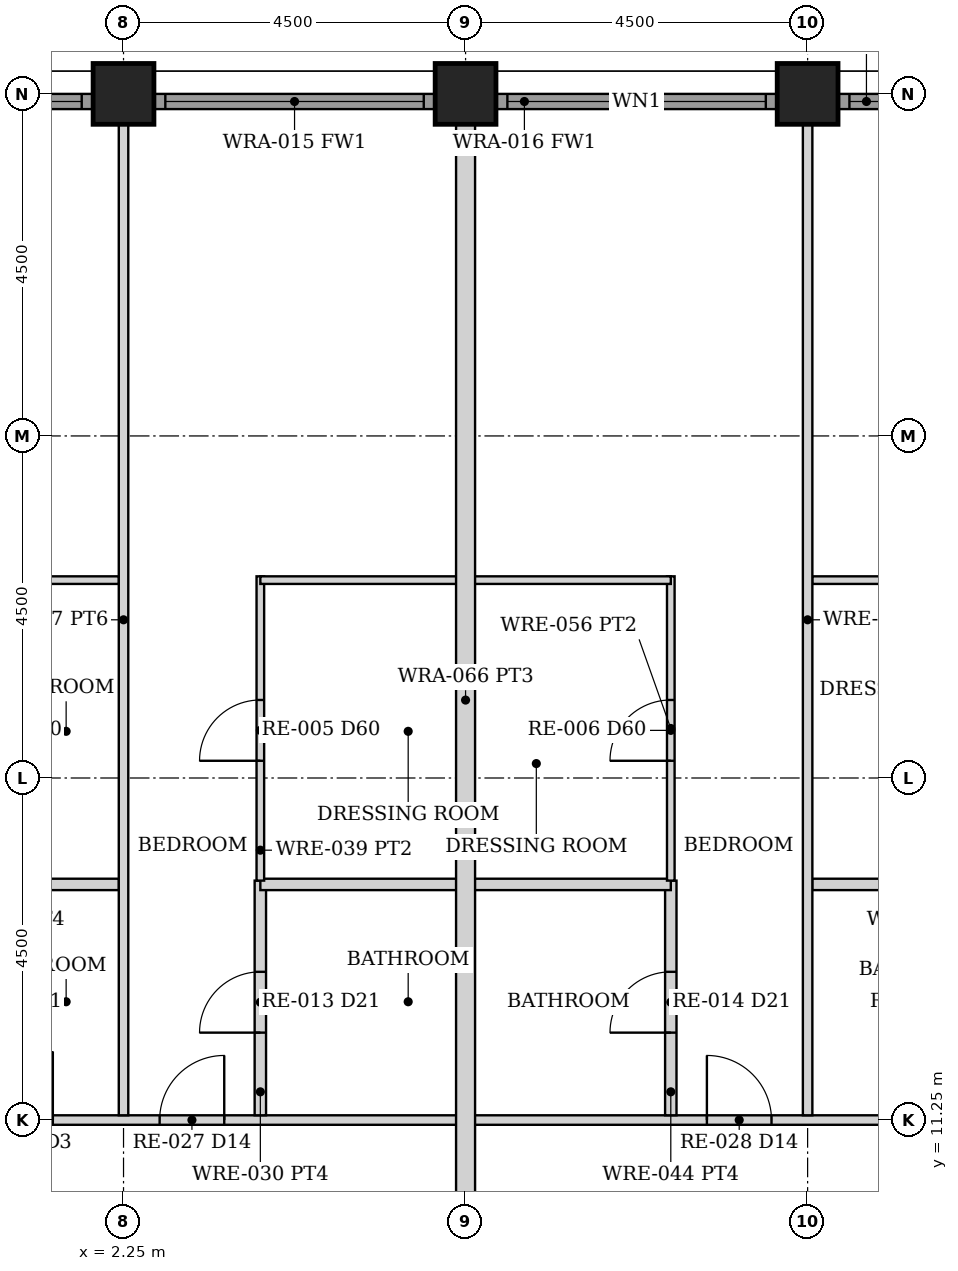
"""IFC4 building model, lengths in metres.
Left out: names, types, materials, properties, quantities, classifications, styles, units other than length and angle.
Written with IfcOpenShell. Run it as: python <this file> out.ifc"""

import sys

from ifc_helpers import new_model, si_unit, direction, frame, frame_2d, origin, origin_2d, place, context, subcontext, project, spatial, rectangle, hollow_rectangle, extrude, element, fill, save


model = new_model("IFC4")
c1 = context("Model", 3, precision=1e-05, world=origin(), true_north=direction((0.0, 1.0)))
c2 = subcontext(c1, "Body", "Model", "MODEL_VIEW")
j1 = project(units=[si_unit("LENGTHUNIT", "METRE"), si_unit("PLANEANGLEUNIT", "RADIAN")], contexts=[c1])
p1 = place(None, origin())
s1 = spatial("IfcSite", under=j1, at=p1, CompositionType="ELEMENT")
p2 = place(p1, origin())
s2 = spatial("IfcBuilding", under=s1, at=p2, CompositionType="ELEMENT")
p3 = place(p2, frame((0.0, 0.0, 68.5)))
s3 = spatial("IfcBuildingStorey", under=s2, at=p3, CompositionType="ELEMENT", Elevation=68.5)
for number, where, z_axis, x_axis in (
    (1, (2.25, 24.75, 0.0), (0.0, 0.0, 1.0), (0.0, 1.0, 0.0)),
    (2, (6.75, 24.75, 0.0), (0.0, 0.0, 1.0), (0.0, 1.0, 0.0)),
    (3, (11.25, 24.75, 0.0), (0.0, 0.0, 1.0), (0.0, 1.0, 0.0)),
):
    element("IfcColumn", number, at=place(p3, frame(where, z_axis=z_axis, x_axis=x_axis)), inside=s3, PredefinedType="COLUMN", context=c2, shape_type="SweptSolid", body=[
        extrude(hollow_rectangle(XDim=0.8, YDim=0.8, WallThickness=0.06, at=origin_2d()), origin(), (0.0, 0.0, 1.0), 3.5),
    ])
p4 = place(p3, frame((-1.845, 24.65, 0.0), z_axis=(0.0, 0.0, 1.0), x_axis=(1.0, 0.0, 0.0)))
e4 = element("IfcWall", 4, at=p4, inside=s3, PredefinedType="SOLIDWALL", context=c2, shape_type="SweptSolid", body=[
    extrude(rectangle(XDim=3.69, YDim=0.2, at=frame_2d((1.845, 0.0))), origin(), (0.0, 0.0, 1.0), 2.379),
])
p5 = place(p4, frame((0.145, 0.0, 0.3)))
e5 = element("IfcOpeningElement", 5, at=p5, cuts=e4, PredefinedType="OPENING", context=c2, shape_type="SweptSolid", body=[
    extrude(rectangle(XDim=3.4, YDim=1.929, at=frame_2d((1.7, 0.964))), frame((0.0, 0.11, 0.0), z_axis=(0.0, -1.0, 0.0), x_axis=(1.0, 0.0, 0.0)), (0.0, 0.0, 1.0), 0.22),
])
p6 = place(p3, frame((2.655, 24.65, 0.0), z_axis=(0.0, 0.0, 1.0), x_axis=(1.0, 0.0, 0.0)))
e6 = element("IfcWall", 6, at=p6, inside=s3, PredefinedType="SOLIDWALL", context=c2, shape_type="SweptSolid", body=[
    extrude(rectangle(XDim=3.69, YDim=0.2, at=frame_2d((1.845, 0.0))), origin(), (0.0, 0.0, 1.0), 2.379),
])
p7 = place(p6, frame((0.145, 0.0, 0.3)))
e7 = element("IfcOpeningElement", 7, at=p7, cuts=e6, PredefinedType="OPENING", context=c2, shape_type="SweptSolid", body=[
    extrude(rectangle(XDim=3.4, YDim=1.929, at=frame_2d((1.7, 0.964))), frame((0.0, 0.11, 0.0), z_axis=(0.0, -1.0, 0.0), x_axis=(1.0, 0.0, 0.0)), (0.0, 0.0, 1.0), 0.22),
])
p8 = place(p3, frame((7.155, 24.65, 0.0), z_axis=(0.0, 0.0, 1.0), x_axis=(1.0, 0.0, 0.0)))
e8 = element("IfcWall", 8, at=p8, inside=s3, PredefinedType="SOLIDWALL", context=c2, shape_type="SweptSolid", body=[
    extrude(rectangle(XDim=3.69, YDim=0.2, at=frame_2d((1.845, 0.0))), origin(), (0.0, 0.0, 1.0), 2.379),
])
p9 = place(p8, frame((0.145, 0.0, 0.3)))
e9 = element("IfcOpeningElement", 9, at=p9, cuts=e8, PredefinedType="OPENING", context=c2, shape_type="SweptSolid", body=[
    extrude(rectangle(XDim=3.4, YDim=1.929, at=frame_2d((1.7, 0.964))), frame((0.0, 0.11, 0.0), z_axis=(0.0, -1.0, 0.0), x_axis=(1.0, 0.0, 0.0)), (0.0, 0.0, 1.0), 0.22),
])
p10 = place(p3, frame((11.655, 24.65, 0.0), z_axis=(0.0, 0.0, 1.0), x_axis=(1.0, 0.0, 0.0)))
e10 = element("IfcWall", 10, at=p10, inside=s3, PredefinedType="SOLIDWALL", context=c2, shape_type="SweptSolid", body=[
    extrude(rectangle(XDim=3.69, YDim=0.2, at=frame_2d((1.845, 0.0))), origin(), (0.0, 0.0, 1.0), 2.379),
])
p11 = place(p10, frame((0.145, 0.0, 0.3)))
e11 = element("IfcOpeningElement", 11, at=p11, cuts=e10, PredefinedType="OPENING", context=c2, shape_type="SweptSolid", body=[
    extrude(rectangle(XDim=3.4, YDim=1.929, at=frame_2d((1.7, 0.964))), frame((0.0, 0.11, 0.0), z_axis=(0.0, -1.0, 0.0), x_axis=(1.0, 0.0, 0.0)), (0.0, 0.0, 1.0), 0.22),
])
p12 = place(p3, frame((-6.65, 11.25, 0.0), z_axis=(0.0, 0.0, 1.0), x_axis=(1.0, 0.0, 0.0)))
e12 = element("IfcWall", 12, at=p12, inside=s3, PredefinedType="PARTITIONING", context=c2, shape_type="SweptSolid", body=[
    extrude(rectangle(XDim=13.3, YDim=0.125, at=frame_2d((6.65, 0.0))), origin(), (0.0, 0.0, 1.0), 2.373),
])
p13 = place(p12, frame((0.7, 0.0, 0.0)))
e13 = element("IfcOpeningElement", 13, at=p13, cuts=e12, PredefinedType="OPENING", context=c2, shape_type="SweptSolid", body=[
    extrude(rectangle(XDim=0.9, YDim=2.1, at=frame_2d((0.45, 1.05))), frame((0.0, 0.073, 0.0), z_axis=(0.0, -1.0, 0.0), x_axis=(1.0, 0.0, 0.0)), (0.0, 0.0, 1.0), 0.145),
])
p14 = place(p12, frame((2.7, 0.0, 0.0)))
e14 = element("IfcOpeningElement", 14, at=p14, cuts=e12, PredefinedType="OPENING", context=c2, shape_type="SweptSolid", body=[
    extrude(rectangle(XDim=1.4, YDim=2.1, at=frame_2d((0.7, 1.05))), frame((0.0, 0.073, 0.0), z_axis=(0.0, -1.0, 0.0), x_axis=(1.0, 0.0, 0.0)), (0.0, 0.0, 1.0), 0.145),
])
p15 = place(p12, frame((4.875, 0.0, 0.0)))
e15 = element("IfcOpeningElement", 15, at=p15, cuts=e12, PredefinedType="OPENING", context=c2, shape_type="SweptSolid", body=[
    extrude(rectangle(XDim=0.85, YDim=2.1, at=frame_2d((0.425, 1.05))), frame((0.0, 0.073, 0.0), z_axis=(0.0, -1.0, 0.0), x_axis=(1.0, 0.0, 0.0)), (0.0, 0.0, 1.0), 0.145),
])
p16 = place(p12, frame((7.07, 0.0, 0.0)))
e16 = element("IfcOpeningElement", 16, at=p16, cuts=e12, PredefinedType="OPENING", context=c2, shape_type="SweptSolid", body=[
    extrude(rectangle(XDim=0.9, YDim=2.1, at=frame_2d((0.45, 1.05))), frame((0.0, 0.073, 0.0), z_axis=(0.0, -1.0, 0.0), x_axis=(1.0, 0.0, 0.0)), (0.0, 0.0, 1.0), 0.145),
])
p17 = place(p12, frame((9.375, 0.0, 0.0)))
e17 = element("IfcOpeningElement", 17, at=p17, cuts=e12, PredefinedType="OPENING", context=c2, shape_type="SweptSolid", body=[
    extrude(rectangle(XDim=0.85, YDim=2.1, at=frame_2d((0.425, 1.05))), frame((0.0, 0.073, 0.0), z_axis=(0.0, -1.0, 0.0), x_axis=(1.0, 0.0, 0.0)), (0.0, 0.0, 1.0), 0.145),
])
p18 = place(p3, frame((-0.45, 14.35, 0.0), z_axis=(0.0, 0.0, 1.0), x_axis=(1.0, 0.0, 0.0)))
e18 = element("IfcWall", 18, at=p18, inside=s3, PredefinedType="PARTITIONING", context=c2, shape_type="SweptSolid", body=[
    extrude(rectangle(XDim=2.64, YDim=0.15, at=frame_2d((1.32, 0.0))), origin(), (0.0, 0.0, 1.0), 2.373),
])
p19 = place(p3, frame((-0.45, 18.353, 0.0), z_axis=(0.0, 0.0, 1.0), x_axis=(1.0, 0.0, 0.0)))
e19 = element("IfcWall", 19, at=p19, inside=s3, PredefinedType="PARTITIONING", context=c2, shape_type="SweptSolid", body=[
    extrude(rectangle(XDim=2.64, YDim=0.1, at=frame_2d((1.32, 0.0))), origin(), (0.0, 0.0, 1.0), 2.373),
])
p20 = place(p3, frame((2.25, 11.312, 0.0), z_axis=(0.0, 0.0, 1.0), x_axis=(0.0, 1.0, 0.0)))
e20 = element("IfcWall", 20, at=p20, inside=s3, PredefinedType="PARTITIONING", context=c2, shape_type="SweptSolid", body=[
    extrude(rectangle(XDim=13.038, YDim=0.125, at=frame_2d((6.519, 0.0))), origin(), (0.0, 0.0, 1.0), 2.373),
])
p21 = place(p3, frame((4.05, 11.312, 0.0), z_axis=(0.0, 0.0, 1.0), x_axis=(0.0, 1.0, 0.0)))
e21 = element("IfcWall", 21, at=p21, inside=s3, PredefinedType="PARTITIONING", context=c2, shape_type="SweptSolid", body=[
    extrude(rectangle(XDim=3.087, YDim=0.15, at=frame_2d((1.544, 0.0))), origin(), (0.0, 0.0, 1.0), 2.373),
])
p22 = place(p21, frame((1.087, 0.0, 0.0)))
e22 = element("IfcOpeningElement", 22, at=p22, cuts=e21, PredefinedType="OPENING", context=c2, shape_type="SweptSolid", body=[
    extrude(rectangle(XDim=0.8, YDim=2.1, at=frame_2d((0.4, 1.05))), frame((0.0, 0.085, 0.0), z_axis=(0.0, -1.0, 0.0), x_axis=(1.0, 0.0, 0.0)), (0.0, 0.0, 1.0), 0.17),
])
p23 = place(p3, frame((4.05, 14.35, 0.0), z_axis=(0.0, 0.0, 1.0), x_axis=(1.0, 0.0, 0.0)))
e23 = element("IfcWall", 23, at=p23, inside=s3, PredefinedType="PARTITIONING", context=c2, shape_type="SweptSolid", body=[
    extrude(rectangle(XDim=2.64, YDim=0.15, at=frame_2d((1.32, 0.0))), origin(), (0.0, 0.0, 1.0), 2.373),
])
p24 = place(p3, frame((4.05, 14.4, 0.0), z_axis=(0.0, 0.0, 1.0), x_axis=(0.0, 1.0, 0.0)))
e24 = element("IfcWall", 24, at=p24, inside=s3, PredefinedType="PARTITIONING", context=c2, shape_type="SweptSolid", body=[
    extrude(rectangle(XDim=4.003, YDim=0.1, at=frame_2d((2.001, 0.0))), origin(), (0.0, 0.0, 1.0), 2.373),
])
p25 = place(p24, frame((1.576, 0.0, 0.0)))
e25 = element("IfcOpeningElement", 25, at=p25, cuts=e24, PredefinedType="OPENING", context=c2, shape_type="SweptSolid", body=[
    extrude(rectangle(XDim=0.8, YDim=2.1, at=frame_2d((0.4, 1.05))), frame((0.0, 0.06, 0.0), z_axis=(0.0, -1.0, 0.0), x_axis=(1.0, 0.0, 0.0)), (0.0, 0.0, 1.0), 0.12),
])
p26 = place(p3, frame((4.05, 18.353, 0.0), z_axis=(0.0, 0.0, 1.0), x_axis=(1.0, 0.0, 0.0)))
e26 = element("IfcWall", 26, at=p26, inside=s3, PredefinedType="PARTITIONING", context=c2, shape_type="SweptSolid", body=[
    extrude(rectangle(XDim=2.64, YDim=0.1, at=frame_2d((1.32, 0.0))), origin(), (0.0, 0.0, 1.0), 2.373),
])
p27 = place(p3, frame((6.85, 11.25, 0.0), z_axis=(0.0, 0.0, 1.0), x_axis=(1.0, 0.0, 0.0)))
e27 = element("IfcWall", 27, at=p27, inside=s3, PredefinedType="PARTITIONING", context=c2, shape_type="SweptSolid", body=[
    extrude(rectangle(XDim=17.5, YDim=0.125, at=frame_2d((8.75, 0.0))), origin(), (0.0, 0.0, 1.0), 2.373),
])
p28 = place(p27, frame((13.975, 0.0, 0.0)))
e28 = element("IfcOpeningElement", 28, at=p28, cuts=e27, PredefinedType="OPENING", context=c2, shape_type="SweptSolid", body=[
    extrude(rectangle(XDim=0.9, YDim=2.1, at=frame_2d((0.45, 1.05))), frame((0.0, 0.073, 0.0), z_axis=(0.0, -1.0, 0.0), x_axis=(1.0, 0.0, 0.0)), (0.0, 0.0, 1.0), 0.145),
])
p29 = place(p27, frame((15.75, 0.0, 0.0)))
e29 = element("IfcOpeningElement", 29, at=p29, cuts=e27, PredefinedType="OPENING", context=c2, shape_type="SweptSolid", body=[
    extrude(rectangle(XDim=1.4, YDim=2.1, at=frame_2d((0.7, 1.05))), frame((0.0, 0.073, 0.0), z_axis=(0.0, -1.0, 0.0), x_axis=(1.0, 0.0, 0.0)), (0.0, 0.0, 1.0), 0.145),
])
p30 = place(p27, frame((12.075, 0.0, 0.0)))
e30 = element("IfcOpeningElement", 30, at=p30, cuts=e27, PredefinedType="OPENING", context=c2, shape_type="SweptSolid", body=[
    extrude(rectangle(XDim=0.85, YDim=2.1, at=frame_2d((0.425, 1.05))), frame((0.0, 0.073, 0.0), z_axis=(0.0, -1.0, 0.0), x_axis=(1.0, 0.0, 0.0)), (0.0, 0.0, 1.0), 0.145),
])
p31 = place(p27, frame((9.83, 0.0, 0.0)))
e31 = element("IfcOpeningElement", 31, at=p31, cuts=e27, PredefinedType="OPENING", context=c2, shape_type="SweptSolid", body=[
    extrude(rectangle(XDim=0.9, YDim=2.1, at=frame_2d((0.45, 1.05))), frame((0.0, 0.073, 0.0), z_axis=(0.0, -1.0, 0.0), x_axis=(1.0, 0.0, 0.0)), (0.0, 0.0, 1.0), 0.145),
])
p32 = place(p27, frame((7.575, 0.0, 0.0)))
e32 = element("IfcOpeningElement", 32, at=p32, cuts=e27, PredefinedType="OPENING", context=c2, shape_type="SweptSolid", body=[
    extrude(rectangle(XDim=0.85, YDim=2.1, at=frame_2d((0.425, 1.05))), frame((0.0, 0.073, 0.0), z_axis=(0.0, -1.0, 0.0), x_axis=(1.0, 0.0, 0.0)), (0.0, 0.0, 1.0), 0.145),
])
p33 = place(p27, frame((3.075, 0.0, 0.0)))
e33 = element("IfcOpeningElement", 33, at=p33, cuts=e27, PredefinedType="OPENING", context=c2, shape_type="SweptSolid", body=[
    extrude(rectangle(XDim=0.85, YDim=2.1, at=frame_2d((0.425, 1.05))), frame((0.0, 0.073, 0.0), z_axis=(0.0, -1.0, 0.0), x_axis=(1.0, 0.0, 0.0)), (0.0, 0.0, 1.0), 0.145),
])
p34 = place(p3, frame((11.31, 14.35, 0.0), z_axis=(0.0, 0.0, 1.0), x_axis=(1.0, 0.0, 0.0)))
e34 = element("IfcWall", 34, at=p34, inside=s3, PredefinedType="PARTITIONING", context=c2, shape_type="SweptSolid", body=[
    extrude(rectangle(XDim=2.64, YDim=0.15, at=frame_2d((1.32, 0.0))), origin(), (0.0, 0.0, 1.0), 2.373),
])
p35 = place(p3, frame((11.31, 18.353, 0.0), z_axis=(0.0, 0.0, 1.0), x_axis=(1.0, 0.0, 0.0)))
e35 = element("IfcWall", 35, at=p35, inside=s3, PredefinedType="PARTITIONING", context=c2, shape_type="SweptSolid", body=[
    extrude(rectangle(XDim=2.64, YDim=0.1, at=frame_2d((1.32, 0.0))), origin(), (0.0, 0.0, 1.0), 2.373),
])
p36 = place(p3, frame((11.25, 11.312, 0.0), z_axis=(0.0, 0.0, 1.0), x_axis=(0.0, 1.0, 0.0)))
e36 = element("IfcWall", 36, at=p36, inside=s3, PredefinedType="PARTITIONING", context=c2, shape_type="SweptSolid", body=[
    extrude(rectangle(XDim=13.038, YDim=0.125, at=frame_2d((6.519, 0.0))), origin(), (0.0, 0.0, 1.0), 2.373),
])
p37 = place(p3, frame((9.45, 11.312, 0.0), z_axis=(0.0, 0.0, 1.0), x_axis=(0.0, 1.0, 0.0)))
e37 = element("IfcWall", 37, at=p37, inside=s3, PredefinedType="PARTITIONING", context=c2, shape_type="SweptSolid", body=[
    extrude(rectangle(XDim=3.087, YDim=0.15, at=frame_2d((1.544, 0.0))), origin(), (0.0, 0.0, 1.0), 2.373),
])
p38 = place(p37, frame((1.087, 0.0, 0.0)))
e38 = element("IfcOpeningElement", 38, at=p38, cuts=e37, PredefinedType="OPENING", context=c2, shape_type="SweptSolid", body=[
    extrude(rectangle(XDim=0.8, YDim=2.1, at=frame_2d((0.4, 1.05))), frame((0.0, 0.085, 0.0), z_axis=(0.0, -1.0, 0.0), x_axis=(1.0, 0.0, 0.0)), (0.0, 0.0, 1.0), 0.17),
])
p39 = place(p3, frame((6.81, 14.35, 0.0), z_axis=(0.0, 0.0, 1.0), x_axis=(1.0, 0.0, 0.0)))
e39 = element("IfcWall", 39, at=p39, inside=s3, PredefinedType="PARTITIONING", context=c2, shape_type="SweptSolid", body=[
    extrude(rectangle(XDim=2.64, YDim=0.15, at=frame_2d((1.32, 0.0))), origin(), (0.0, 0.0, 1.0), 2.373),
])
p40 = place(p3, frame((9.45, 14.4, 0.0), z_axis=(0.0, 0.0, 1.0), x_axis=(0.0, 1.0, 0.0)))
e40 = element("IfcWall", 40, at=p40, inside=s3, PredefinedType="PARTITIONING", context=c2, shape_type="SweptSolid", body=[
    extrude(rectangle(XDim=4.003, YDim=0.1, at=frame_2d((2.001, 0.0))), origin(), (0.0, 0.0, 1.0), 2.373),
])
p41 = place(p40, frame((1.576, 0.0, 0.0)))
e41 = element("IfcOpeningElement", 41, at=p41, cuts=e40, PredefinedType="OPENING", context=c2, shape_type="SweptSolid", body=[
    extrude(rectangle(XDim=0.8, YDim=2.1, at=frame_2d((0.4, 1.05))), frame((0.0, 0.06, 0.0), z_axis=(0.0, -1.0, 0.0), x_axis=(1.0, 0.0, 0.0)), (0.0, 0.0, 1.0), 0.12),
])
p42 = place(p3, frame((6.81, 18.353, 0.0), z_axis=(0.0, 0.0, 1.0), x_axis=(1.0, 0.0, 0.0)))
e42 = element("IfcWall", 42, at=p42, inside=s3, PredefinedType="PARTITIONING", context=c2, shape_type="SweptSolid", body=[
    extrude(rectangle(XDim=2.64, YDim=0.1, at=frame_2d((1.32, 0.0))), origin(), (0.0, 0.0, 1.0), 2.373),
])
p43 = place(p3, frame((6.75, 9.2, 0.0), z_axis=(0.0, 0.0, 1.0), x_axis=(0.0, 1.0, 0.0)))
e43 = element("IfcWall", 43, at=p43, inside=s3, PredefinedType="PARTITIONING", context=c2, shape_type="SweptSolid", body=[
    extrude(rectangle(XDim=15.15, YDim=0.25, at=frame_2d((7.575, 0.0))), origin(), (0.0, 0.0, 1.0), 2.373),
])
p44 = place(p5, origin())
e44 = element("IfcWindow", 44, at=p44, inside=s3, PartitioningType="SINGLE_PANEL", PredefinedType="WINDOW", context=c2, shape_type="SweptSolid", body=[
    extrude(rectangle(XDim=3.4, YDim=1.929, at=frame_2d((1.7, 0.964))), frame((0.0, 0.03, 0.0), z_axis=(0.0, -1.0, 0.0), x_axis=(1.0, 0.0, 0.0)), (0.0, 0.0, 1.0), 0.06),
])
fill(e5, e44)
p45 = place(p7, origin())
e45 = element("IfcWindow", 45, at=p45, inside=s3, PartitioningType="SINGLE_PANEL", PredefinedType="WINDOW", context=c2, shape_type="SweptSolid", body=[
    extrude(rectangle(XDim=3.4, YDim=1.929, at=frame_2d((1.7, 0.964))), frame((0.0, 0.03, 0.0), z_axis=(0.0, -1.0, 0.0), x_axis=(1.0, 0.0, 0.0)), (0.0, 0.0, 1.0), 0.06),
])
fill(e7, e45)
p46 = place(p9, origin())
e46 = element("IfcWindow", 46, at=p46, inside=s3, PartitioningType="SINGLE_PANEL", PredefinedType="WINDOW", context=c2, shape_type="SweptSolid", body=[
    extrude(rectangle(XDim=3.4, YDim=1.929, at=frame_2d((1.7, 0.964))), frame((0.0, 0.03, 0.0), z_axis=(0.0, -1.0, 0.0), x_axis=(1.0, 0.0, 0.0)), (0.0, 0.0, 1.0), 0.06),
])
fill(e9, e46)
p47 = place(p11, origin())
e47 = element("IfcWindow", 47, at=p47, inside=s3, PartitioningType="SINGLE_PANEL", PredefinedType="WINDOW", context=c2, shape_type="SweptSolid", body=[
    extrude(rectangle(XDim=3.4, YDim=1.929, at=frame_2d((1.7, 0.964))), frame((0.0, 0.03, 0.0), z_axis=(0.0, -1.0, 0.0), x_axis=(1.0, 0.0, 0.0)), (0.0, 0.0, 1.0), 0.06),
])
fill(e11, e47)
p48 = place(p16, origin())
e48 = element("IfcDoor", 48, at=p48, inside=s3, OperationType="SINGLE_SWING_RIGHT", PredefinedType="DOOR", context=c2, shape_type="SweptSolid", body=[
    extrude(rectangle(XDim=0.9, YDim=2.1, at=frame_2d((0.45, 1.05))), frame((0.0, 0.025, 0.0), z_axis=(0.0, -1.0, 0.0), x_axis=(1.0, 0.0, 0.0)), (0.0, 0.0, 1.0), 0.05),
])
fill(e16, e48)
p49 = place(p17, origin())
e49 = element("IfcDoor", 49, at=p49, inside=s3, OperationType="SINGLE_SWING_RIGHT", PredefinedType="DOOR", context=c2, shape_type="SweptSolid", body=[
    extrude(rectangle(XDim=0.85, YDim=2.1, at=frame_2d((0.425, 1.05))), frame((0.0, 0.025, 0.0), z_axis=(0.0, -1.0, 0.0), x_axis=(1.0, 0.0, 0.0)), (0.0, 0.0, 1.0), 0.05),
])
fill(e17, e49)
p50 = place(p22, origin())
e50 = element("IfcDoor", 50, at=p50, inside=s3, OperationType="SINGLE_SWING_LEFT", PredefinedType="DOOR", context=c2, shape_type="SweptSolid", body=[
    extrude(rectangle(XDim=0.8, YDim=2.1, at=frame_2d((0.4, 1.05))), frame((0.0, 0.025, 0.0), z_axis=(0.0, -1.0, 0.0), x_axis=(1.0, 0.0, 0.0)), (0.0, 0.0, 1.0), 0.05),
])
fill(e22, e50)
p51 = place(p25, origin())
e51 = element("IfcDoor", 51, at=p51, inside=s3, OperationType="SINGLE_SWING_LEFT", PredefinedType="DOOR", context=c2, shape_type="SweptSolid", body=[
    extrude(rectangle(XDim=0.8, YDim=2.1, at=frame_2d((0.4, 1.05))), frame((0.0, 0.025, 0.0), z_axis=(0.0, -1.0, 0.0), x_axis=(1.0, 0.0, 0.0)), (0.0, 0.0, 1.0), 0.05),
])
fill(e25, e51)
p52 = place(p33, origin())
e52 = element("IfcDoor", 52, at=p52, inside=s3, OperationType="SINGLE_SWING_LEFT", PredefinedType="DOOR", context=c2, shape_type="SweptSolid", body=[
    extrude(rectangle(XDim=0.85, YDim=2.1, at=frame_2d((0.425, 1.05))), frame((0.0, 0.025, 0.0), z_axis=(0.0, -1.0, 0.0), x_axis=(1.0, 0.0, 0.0)), (0.0, 0.0, 1.0), 0.05),
])
fill(e33, e52)
p53 = place(p38, origin())
e53 = element("IfcDoor", 53, at=p53, inside=s3, OperationType="SINGLE_SWING_LEFT", PredefinedType="DOOR", context=c2, shape_type="SweptSolid", body=[
    extrude(rectangle(XDim=0.8, YDim=2.1, at=frame_2d((0.4, 1.05))), frame((0.0, 0.025, 0.0), z_axis=(0.0, -1.0, 0.0), x_axis=(1.0, 0.0, 0.0)), (0.0, 0.0, 1.0), 0.05),
])
fill(e38, e53)
p54 = place(p41, origin())
e54 = element("IfcDoor", 54, at=p54, inside=s3, OperationType="SINGLE_SWING_LEFT", PredefinedType="DOOR", context=c2, shape_type="SweptSolid", body=[
    extrude(rectangle(XDim=0.8, YDim=2.1, at=frame_2d((0.4, 1.05))), frame((0.0, 0.025, 0.0), z_axis=(0.0, -1.0, 0.0), x_axis=(1.0, 0.0, 0.0)), (0.0, 0.0, 1.0), 0.05),
])
fill(e41, e54)
save(model, sys.argv[1])
